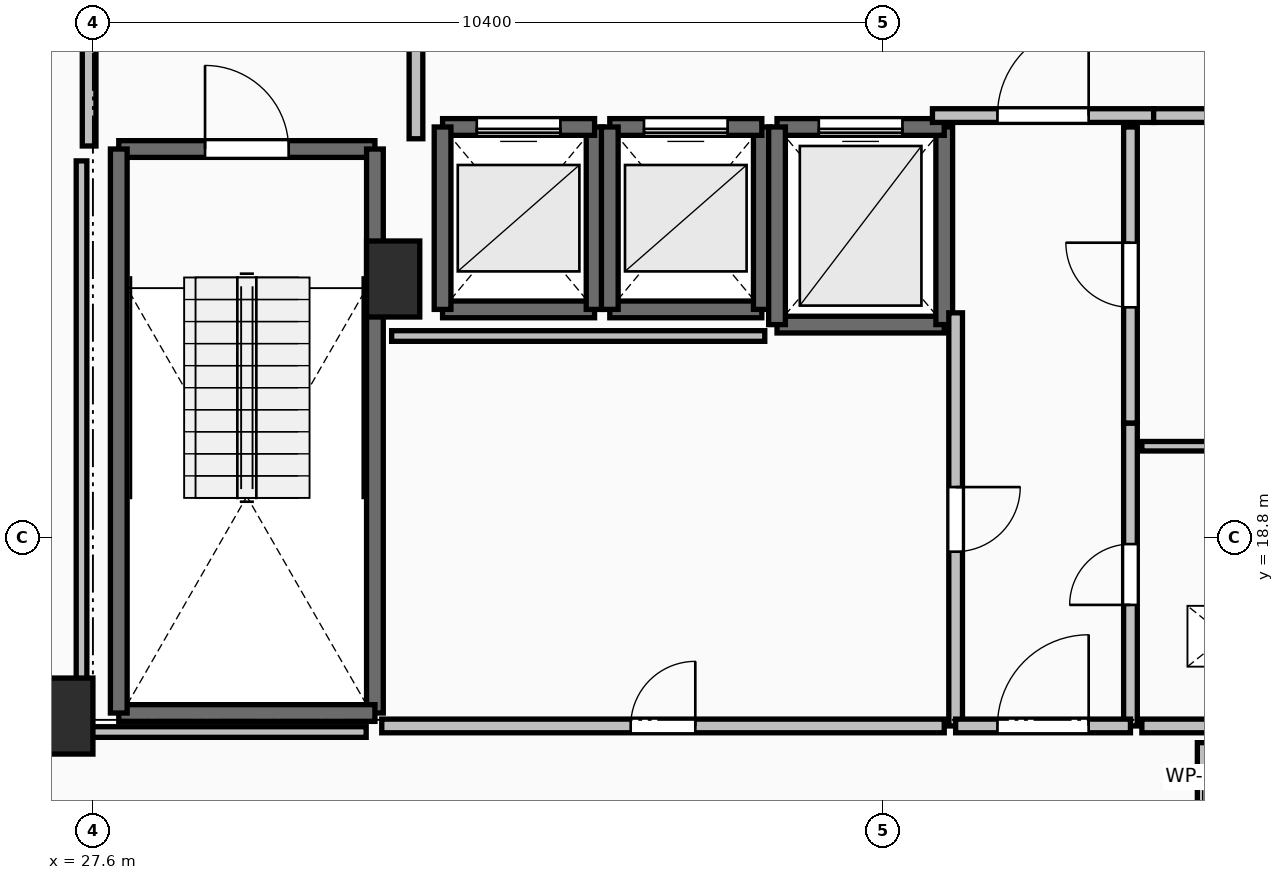
"""IFC4 building model, lengths in metres.
Left out: names, types, materials, properties, quantities, classifications, styles, units other than length and angle.
Written with IfcOpenShell. Run it as: python <this file> out.ifc"""

import sys

from ifc_helpers import new_model, si_unit, direction, frame, frame_2d, origin, origin_2d, place, context, subcontext, project, spatial, rectangle, extrude, element, fill, save


model = new_model("IFC4")
c1 = context("Model", 3, precision=1e-05, world=origin(), true_north=direction((0.0, 1.0)))
c2 = subcontext(c1, "Body", "Model", "MODEL_VIEW")
j1 = project(units=[si_unit("LENGTHUNIT", "METRE"), si_unit("PLANEANGLEUNIT", "RADIAN")], contexts=[c1])
p1 = place(None, origin())
s1 = spatial("IfcSite", under=j1, at=p1, CompositionType="ELEMENT")
p2 = place(p1, origin())
s2 = spatial("IfcBuilding", under=s1, at=p2, CompositionType="ELEMENT")
p3 = place(p2, frame((0.0, 0.0, 210.75)))
s3 = spatial("IfcBuildingStorey", under=s2, at=p3, CompositionType="ELEMENT", Elevation=210.75)
for number, where, z_axis, x_axis in (
    (1, (27.25, 16.45, 0.0), (0.0, 0.0, 1.0), (1.0, 0.0, 0.0)),
    (2, (31.55, 22.2, 0.0), (0.0, 0.0, 1.0), (1.0, 0.0, 0.0)),
):
    element("IfcColumn", number, at=place(p3, frame(where, z_axis=z_axis, x_axis=x_axis)), inside=s3, PredefinedType="PILASTER", context=c2, shape_type="SweptSolid", body=[
        extrude(rectangle(XDim=0.7, YDim=1.0, at=origin_2d()), origin(), (0.0, 0.0, 1.0), 3.55),
    ])
p4 = place(p3, frame((27.94, 23.91, 0.0), z_axis=(0.0, 0.0, 1.0), x_axis=(1.0, 0.0, 0.0)))
e3 = element("IfcWall", 3, at=p4, inside=s3, PredefinedType="SOLIDWALL", context=c2, shape_type="SweptSolid", body=[
    extrude(rectangle(XDim=3.37, YDim=0.22, at=frame_2d((1.685, 0.0))), origin(), (0.0, 0.0, 1.0), 3.29),
])
p5 = place(p4, frame((1.135, 0.0, 0.0)))
e4 = element("IfcOpeningElement", 4, at=p5, cuts=e3, PredefinedType="OPENING", context=c2, shape_type="SweptSolid", body=[
    extrude(rectangle(XDim=1.1, YDim=2.15, at=frame_2d((0.55, 1.075))), frame((0.0, 0.125, 0.0), z_axis=(0.0, -1.0, 0.0), x_axis=(1.0, 0.0, 0.0)), (0.0, 0.0, 1.0), 0.25),
])
p6 = place(p3, frame((31.31, 23.91, 0.0), z_axis=(0.0, 0.0, 1.0), x_axis=(0.0, -1.0, 0.0)))
e5 = element("IfcWall", 5, at=p6, inside=s3, PredefinedType="SOLIDWALL", context=c2, shape_type="SweptSolid", body=[
    extrude(rectangle(XDim=7.42, YDim=0.22, at=frame_2d((3.71, 0.0))), origin(), (0.0, 0.0, 1.0), 3.29),
])
p7 = place(p3, frame((31.31, 16.49, 0.0), z_axis=(0.0, 0.0, 1.0), x_axis=(-1.0, 0.0, 0.0)))
e6 = element("IfcWall", 6, at=p7, inside=s3, PredefinedType="SOLIDWALL", context=c2, shape_type="SweptSolid", body=[
    extrude(rectangle(XDim=3.37, YDim=0.22, at=frame_2d((1.685, 0.0))), origin(), (0.0, 0.0, 1.0), 3.29),
])
p8 = place(p3, frame((27.94, 16.49, 0.0), z_axis=(0.0, 0.0, 1.0), x_axis=(0.0, 1.0, 0.0)))
e7 = element("IfcWall", 7, at=p8, inside=s3, PredefinedType="SOLIDWALL", context=c2, shape_type="SweptSolid", body=[
    extrude(rectangle(XDim=7.42, YDim=0.22, at=frame_2d((3.71, 0.0))), origin(), (0.0, 0.0, 1.0), 3.29),
])
p9 = place(p3, frame((32.2, 21.8, 0.0), z_axis=(0.0, 0.0, 1.0), x_axis=(1.0, 0.0, 0.0)))
e8 = element("IfcWall", 8, at=p9, inside=s3, PredefinedType="SOLIDWALL", context=c2, shape_type="SweptSolid", body=[
    extrude(rectangle(XDim=2.0, YDim=0.22, at=frame_2d((1.0, 0.0))), origin(), (0.0, 0.0, 1.0), 3.29),
])
p10 = place(p3, frame((34.2, 21.8, 0.0), z_axis=(0.0, 0.0, 1.0), x_axis=(0.0, 1.0, 0.0)))
e9 = element("IfcWall", 9, at=p10, inside=s3, PredefinedType="SOLIDWALL", context=c2, shape_type="SweptSolid", body=[
    extrude(rectangle(XDim=2.4, YDim=0.22, at=frame_2d((1.2, 0.0))), origin(), (0.0, 0.0, 1.0), 3.29),
])
p11 = place(p3, frame((34.2, 24.2, 0.0), z_axis=(0.0, 0.0, 1.0), x_axis=(-1.0, 0.0, 0.0)))
e10 = element("IfcWall", 10, at=p11, inside=s3, PredefinedType="SOLIDWALL", context=c2, shape_type="SweptSolid", body=[
    extrude(rectangle(XDim=2.0, YDim=0.22, at=frame_2d((1.0, 0.0))), origin(), (0.0, 0.0, 1.0), 3.29),
])
p12 = place(p11, frame((0.45, 0.0, 0.0)))
e11 = element("IfcOpeningElement", 11, at=p12, cuts=e10, PredefinedType="OPENING", context=c2, shape_type="SweptSolid", body=[
    extrude(rectangle(XDim=1.1, YDim=2.2, at=frame_2d((0.55, 1.1))), frame((0.0, 0.125, 0.0), z_axis=(0.0, -1.0, 0.0), x_axis=(1.0, 0.0, 0.0)), (0.0, 0.0, 1.0), 0.25),
])
p13 = place(p3, frame((32.2, 24.2, 0.0), z_axis=(0.0, 0.0, 1.0), x_axis=(0.0, -1.0, 0.0)))
e12 = element("IfcWall", 12, at=p13, inside=s3, PredefinedType="SOLIDWALL", context=c2, shape_type="SweptSolid", body=[
    extrude(rectangle(XDim=2.4, YDim=0.22, at=frame_2d((1.2, 0.0))), origin(), (0.0, 0.0, 1.0), 3.29),
])
p14 = place(p3, frame((34.4, 21.8, 0.0), z_axis=(0.0, 0.0, 1.0), x_axis=(1.0, 0.0, 0.0)))
e13 = element("IfcWall", 13, at=p14, inside=s3, PredefinedType="SOLIDWALL", context=c2, shape_type="SweptSolid", body=[
    extrude(rectangle(XDim=2.0, YDim=0.22, at=frame_2d((1.0, 0.0))), origin(), (0.0, 0.0, 1.0), 3.29),
])
p15 = place(p3, frame((36.4, 21.8, 0.0), z_axis=(0.0, 0.0, 1.0), x_axis=(0.0, 1.0, 0.0)))
e14 = element("IfcWall", 14, at=p15, inside=s3, PredefinedType="SOLIDWALL", context=c2, shape_type="SweptSolid", body=[
    extrude(rectangle(XDim=2.4, YDim=0.22, at=frame_2d((1.2, 0.0))), origin(), (0.0, 0.0, 1.0), 3.29),
])
p16 = place(p3, frame((36.4, 24.2, 0.0), z_axis=(0.0, 0.0, 1.0), x_axis=(-1.0, 0.0, 0.0)))
e15 = element("IfcWall", 15, at=p16, inside=s3, PredefinedType="SOLIDWALL", context=c2, shape_type="SweptSolid", body=[
    extrude(rectangle(XDim=2.0, YDim=0.22, at=frame_2d((1.0, 0.0))), origin(), (0.0, 0.0, 1.0), 3.29),
])
p17 = place(p16, frame((0.45, 0.0, 0.0)))
e16 = element("IfcOpeningElement", 16, at=p17, cuts=e15, PredefinedType="OPENING", context=c2, shape_type="SweptSolid", body=[
    extrude(rectangle(XDim=1.1, YDim=2.2, at=frame_2d((0.55, 1.1))), frame((0.0, 0.125, 0.0), z_axis=(0.0, -1.0, 0.0), x_axis=(1.0, 0.0, 0.0)), (0.0, 0.0, 1.0), 0.25),
])
p18 = place(p3, frame((34.4, 24.2, 0.0), z_axis=(0.0, 0.0, 1.0), x_axis=(0.0, -1.0, 0.0)))
e17 = element("IfcWall", 17, at=p18, inside=s3, PredefinedType="SOLIDWALL", context=c2, shape_type="SweptSolid", body=[
    extrude(rectangle(XDim=2.4, YDim=0.22, at=frame_2d((1.2, 0.0))), origin(), (0.0, 0.0, 1.0), 3.29),
])
p19 = place(p3, frame((36.6, 21.6, 0.0), z_axis=(0.0, 0.0, 1.0), x_axis=(1.0, 0.0, 0.0)))
e18 = element("IfcWall", 18, at=p19, inside=s3, PredefinedType="SOLIDWALL", context=c2, shape_type="SweptSolid", body=[
    extrude(rectangle(XDim=2.2, YDim=0.22, at=frame_2d((1.1, 0.0))), origin(), (0.0, 0.0, 1.0), 3.29),
])
p20 = place(p3, frame((38.8, 21.6, 0.0), z_axis=(0.0, 0.0, 1.0), x_axis=(0.0, 1.0, 0.0)))
e19 = element("IfcWall", 19, at=p20, inside=s3, PredefinedType="SOLIDWALL", context=c2, shape_type="SweptSolid", body=[
    extrude(rectangle(XDim=2.6, YDim=0.22, at=frame_2d((1.3, 0.0))), origin(), (0.0, 0.0, 1.0), 3.29),
])
p21 = place(p3, frame((38.8, 24.2, 0.0), z_axis=(0.0, 0.0, 1.0), x_axis=(-1.0, 0.0, 0.0)))
e20 = element("IfcWall", 20, at=p21, inside=s3, PredefinedType="SOLIDWALL", context=c2, shape_type="SweptSolid", body=[
    extrude(rectangle(XDim=2.2, YDim=0.22, at=frame_2d((1.1, 0.0))), origin(), (0.0, 0.0, 1.0), 3.29),
])
p22 = place(p21, frame((0.55, 0.0, 0.0)))
e21 = element("IfcOpeningElement", 21, at=p22, cuts=e20, PredefinedType="OPENING", context=c2, shape_type="SweptSolid", body=[
    extrude(rectangle(XDim=1.1, YDim=2.2, at=frame_2d((0.55, 1.1))), frame((0.0, 0.125, 0.0), z_axis=(0.0, -1.0, 0.0), x_axis=(1.0, 0.0, 0.0)), (0.0, 0.0, 1.0), 0.25),
])
p23 = place(p3, frame((36.6, 24.2, 0.0), z_axis=(0.0, 0.0, 1.0), x_axis=(0.0, -1.0, 0.0)))
e22 = element("IfcWall", 22, at=p23, inside=s3, PredefinedType="SOLIDWALL", context=c2, shape_type="SweptSolid", body=[
    extrude(rectangle(XDim=2.6, YDim=0.22, at=frame_2d((1.3, 0.0))), origin(), (0.0, 0.0, 1.0), 3.29),
])
p24 = place(p3, frame((31.85, 24.045, 0.0), z_axis=(0.0, 0.0, 1.0), x_axis=(0.0, 1.0, 0.0)))
e23 = element("IfcWall", 23, at=p24, inside=s3, PredefinedType="PARTITIONING", context=c2, shape_type="SweptSolid", body=[
    extrude(rectangle(XDim=3.91, YDim=0.18, at=frame_2d((1.955, 0.0))), origin(), (0.0, 0.0, 1.0), 3.29),
])
p25 = place(p24, frame((1.355, 0.0, 0.0)))
e24 = element("IfcOpeningElement", 24, at=p25, cuts=e23, PredefinedType="OPENING", context=c2, shape_type="SweptSolid", body=[
    extrude(rectangle(XDim=1.2, YDim=2.15, at=frame_2d((0.6, 1.075))), frame((0.0, 0.105, 0.0), z_axis=(0.0, -1.0, 0.0), x_axis=(1.0, 0.0, 0.0)), (0.0, 0.0, 1.0), 0.21),
])
p26 = place(p3, frame((27.55, 28.0, 0.0), z_axis=(0.0, 0.0, 1.0), x_axis=(0.0, -1.0, 0.0)))
e25 = element("IfcWall", 25, at=p26, inside=s3, PredefinedType="PARTITIONING", context=c2, shape_type="SweptSolid", body=[
    extrude(rectangle(XDim=4.05, YDim=0.18, at=frame_2d((2.025, 0.0))), origin(), (0.0, 0.0, 1.0), 3.29),
])
p27 = place(p26, frame((1.425, 0.0, 0.0)))
e26 = element("IfcOpeningElement", 26, at=p27, cuts=e25, PredefinedType="OPENING", context=c2, shape_type="SweptSolid", body=[
    extrude(rectangle(XDim=1.2, YDim=2.15, at=frame_2d((0.6, 1.075))), frame((0.0, 0.105, 0.0), z_axis=(0.0, -1.0, 0.0), x_axis=(1.0, 0.0, 0.0)), (0.0, 0.0, 1.0), 0.21),
])
p28 = place(p3, frame((38.645, 24.35, 0.0), z_axis=(0.0, 0.0, 1.0), x_axis=(1.0, 0.0, 0.0)))
e27 = element("IfcWall", 27, at=p28, inside=s3, PredefinedType="PARTITIONING", context=c2, shape_type="SweptSolid", body=[
    extrude(rectangle(XDim=2.91, YDim=0.18, at=frame_2d((1.455, 0.0))), origin(), (0.0, 0.0, 1.0), 3.29),
])
p29 = place(p28, frame((0.855, 0.0, 0.0)))
e28 = element("IfcOpeningElement", 28, at=p29, cuts=e27, PredefinedType="OPENING", context=c2, shape_type="SweptSolid", body=[
    extrude(rectangle(XDim=1.2, YDim=2.15, at=frame_2d((0.6, 1.075))), frame((0.0, 0.105, 0.0), z_axis=(0.0, -1.0, 0.0), x_axis=(1.0, 0.0, 0.0)), (0.0, 0.0, 1.0), 0.21),
])
p30 = place(p3, frame((41.555, 24.35, 0.0), z_axis=(0.0, 0.0, 1.0), x_axis=(1.0, 0.0, 0.0)))
e29 = element("IfcWall", 29, at=p30, inside=s3, PredefinedType="PARTITIONING", context=c2, shape_type="SweptSolid", body=[
    extrude(rectangle(XDim=2.445, YDim=0.18, at=frame_2d((1.223, 0.0))), origin(), (0.0, 0.0, 1.0), 3.29),
])
p31 = place(p30, frame((0.798, 0.0, 0.0)))
e30 = element("IfcOpeningElement", 30, at=p31, cuts=e29, PredefinedType="OPENING", context=c2, shape_type="SweptSolid", body=[
    extrude(rectangle(XDim=0.85, YDim=2.1, at=frame_2d((0.425, 1.05))), frame((0.0, 0.105, 0.0), z_axis=(0.0, -1.0, 0.0), x_axis=(1.0, 0.0, 0.0)), (0.0, 0.0, 1.0), 0.21),
])
p32 = place(p3, frame((41.25, 16.32, 0.0), z_axis=(0.0, 0.0, 1.0), x_axis=(0.0, 1.0, 0.0)))
e31 = element("IfcWall", 31, at=p32, inside=s3, PredefinedType="PARTITIONING", context=c2, shape_type="SweptSolid", body=[
    extrude(rectangle(XDim=3.985, YDim=0.18, at=frame_2d((1.992, 0.0))), origin(), (0.0, 0.0, 1.0), 3.29),
])
p33 = place(p32, frame((1.593, 0.0, 0.0)))
e32 = element("IfcOpeningElement", 32, at=p33, cuts=e31, PredefinedType="OPENING", context=c2, shape_type="SweptSolid", body=[
    extrude(rectangle(XDim=0.8, YDim=2.05, at=frame_2d((0.4, 1.025))), frame((0.0, 0.105, 0.0), z_axis=(0.0, -1.0, 0.0), x_axis=(1.0, 0.0, 0.0)), (0.0, 0.0, 1.0), 0.21),
])
p34 = place(p3, frame((41.25, 20.305, 0.0), z_axis=(0.0, 0.0, 1.0), x_axis=(0.0, 1.0, 0.0)))
e33 = element("IfcWall", 33, at=p34, inside=s3, PredefinedType="PARTITIONING", context=c2, shape_type="SweptSolid", body=[
    extrude(rectangle(XDim=3.895, YDim=0.18, at=frame_2d((1.948, 0.0))), origin(), (0.0, 0.0, 1.0), 3.29),
])
p35 = place(p34, frame((1.522, 0.0, 0.0)))
e34 = element("IfcOpeningElement", 34, at=p35, cuts=e33, PredefinedType="OPENING", context=c2, shape_type="SweptSolid", body=[
    extrude(rectangle(XDim=0.85, YDim=2.1, at=frame_2d((0.425, 1.05))), frame((0.0, 0.105, 0.0), z_axis=(0.0, -1.0, 0.0), x_axis=(1.0, 0.0, 0.0)), (0.0, 0.0, 1.0), 0.21),
])
p36 = place(p3, frame((38.95, 21.755, 0.0), z_axis=(0.0, 0.0, 1.0), x_axis=(0.0, -1.0, 0.0)))
e35 = element("IfcWall", 35, at=p36, inside=s3, PredefinedType="PARTITIONING", context=c2, shape_type="SweptSolid", body=[
    extrude(rectangle(XDim=5.435, YDim=0.18, at=frame_2d((2.717, 0.0))), origin(), (0.0, 0.0, 1.0), 3.29),
])
p37 = place(p36, frame((2.292, 0.0, 0.0)))
e36 = element("IfcOpeningElement", 36, at=p37, cuts=e35, PredefinedType="OPENING", context=c2, shape_type="SweptSolid", body=[
    extrude(rectangle(XDim=0.85, YDim=2.1, at=frame_2d((0.425, 1.05))), frame((0.0, 0.105, 0.0), z_axis=(0.0, -1.0, 0.0), x_axis=(1.0, 0.0, 0.0)), (0.0, 0.0, 1.0), 0.21),
])
p38 = place(p3, frame((38.95, 16.32, 0.0), z_axis=(0.0, 0.0, 1.0), x_axis=(1.0, 0.0, 0.0)))
e37 = element("IfcWall", 37, at=p38, inside=s3, PredefinedType="PARTITIONING", context=c2, shape_type="SweptSolid", body=[
    extrude(rectangle(XDim=2.3, YDim=0.18, at=frame_2d((1.15, 0.0))), origin(), (0.0, 0.0, 1.0), 3.29),
])
p39 = place(p38, frame((0.55, 0.0, 0.0)))
e38 = element("IfcOpeningElement", 38, at=p39, cuts=e37, PredefinedType="OPENING", context=c2, shape_type="SweptSolid", body=[
    extrude(rectangle(XDim=1.2, YDim=2.15, at=frame_2d((0.6, 1.075))), frame((0.0, 0.105, 0.0), z_axis=(0.0, -1.0, 0.0), x_axis=(1.0, 0.0, 0.0)), (0.0, 0.0, 1.0), 0.21),
])
p40 = place(p3, frame((44.6, 20.0, 0.0), z_axis=(0.0, 0.0, 1.0), x_axis=(-1.0, 0.0, 0.0)))
e39 = element("IfcWall", 39, at=p40, inside=s3, PredefinedType="PARTITIONING", context=c2, shape_type="SweptSolid", body=[
    extrude(rectangle(XDim=3.2, YDim=0.125, at=frame_2d((1.6, 0.0))), origin(), (0.0, 0.0, 1.0), 3.29),
])
p41 = place(p3, frame((41.4, 16.32, 0.0), z_axis=(0.0, 0.0, 1.0), x_axis=(1.0, 0.0, 0.0)))
e40 = element("IfcWall", 40, at=p41, inside=s3, PredefinedType="PARTITIONING", context=c2, shape_type="SweptSolid", body=[
    extrude(rectangle(XDim=3.2, YDim=0.18, at=frame_2d((1.6, 0.0))), origin(), (0.0, 0.0, 1.0), 3.29),
])
p42 = place(p41, frame((1.2, 0.0, 0.0)))
e41 = element("IfcOpeningElement", 41, at=p42, cuts=e40, PredefinedType="OPENING", context=c2, shape_type="SweptSolid", body=[
    extrude(rectangle(XDim=0.8, YDim=2.05, at=frame_2d((0.4, 1.025))), frame((0.0, 0.105, 0.0), z_axis=(0.0, -1.0, 0.0), x_axis=(1.0, 0.0, 0.0)), (0.0, 0.0, 1.0), 0.21),
])
p43 = place(p3, frame((31.4, 16.32, 0.0), z_axis=(0.0, 0.0, 1.0), x_axis=(1.0, 0.0, 0.0)))
e42 = element("IfcWall", 42, at=p43, inside=s3, PredefinedType="PARTITIONING", context=c2, shape_type="SweptSolid", body=[
    extrude(rectangle(XDim=7.4, YDim=0.18, at=frame_2d((3.7, 0.0))), origin(), (0.0, 0.0, 1.0), 3.29),
])
p44 = place(p43, frame((3.275, 0.0, 0.0)))
e43 = element("IfcOpeningElement", 43, at=p44, cuts=e42, PredefinedType="OPENING", context=c2, shape_type="SweptSolid", body=[
    extrude(rectangle(XDim=0.85, YDim=2.1, at=frame_2d((0.425, 1.05))), frame((0.0, 0.105, 0.0), z_axis=(0.0, -1.0, 0.0), x_axis=(1.0, 0.0, 0.0)), (0.0, 0.0, 1.0), 0.21),
])
p45 = place(p3, frame((36.439, 21.45, 0.0), z_axis=(0.0, 0.0, 1.0), x_axis=(-1.0, 0.0, 0.0)))
e44 = element("IfcWall", 44, at=p45, inside=s3, PredefinedType="PARTITIONING", context=c2, shape_type="SweptSolid", body=[
    extrude(rectangle(XDim=4.909, YDim=0.14, at=frame_2d((2.455, 0.0))), origin(), (0.0, 0.0, 1.0), 3.29),
])
p46 = place(p3, frame((27.45, 23.754, 0.0), z_axis=(0.0, 0.0, 1.0), x_axis=(0.0, -1.0, 0.0)))
e45 = element("IfcWall", 45, at=p46, inside=s3, PredefinedType="PARTITIONING", context=c2, shape_type="SweptSolid", body=[
    extrude(rectangle(XDim=7.514, YDim=0.14, at=frame_2d((3.757, 0.0))), origin(), (0.0, 0.0, 1.0), 2.482),
])
p47 = place(p3, frame((27.45, 16.24, 0.0), z_axis=(0.0, 0.0, 1.0), x_axis=(1.0, 0.0, 0.0)))
e46 = element("IfcWall", 46, at=p47, inside=s3, PredefinedType="PARTITIONING", context=c2, shape_type="SweptSolid", body=[
    extrude(rectangle(XDim=3.745, YDim=0.14, at=frame_2d((1.873, 0.0))), origin(), (0.0, 0.0, 1.0), 2.482),
])
p48 = place(p3, frame((42.2, 16.1, 0.0), z_axis=(0.0, 0.0, 1.0), x_axis=(0.0, -1.0, 0.0)))
e47 = element("IfcWall", 47, at=p48, inside=s3, PredefinedType="PARTITIONING", context=c2, shape_type="SweptSolid", body=[
    extrude(rectangle(XDim=1.83, YDim=0.14, at=frame_2d((0.915, 0.0))), origin(), (0.0, 0.0, 1.0), 2.979),
])
p49 = place(p5, origin())
e48 = element("IfcDoor", 48, at=p49, inside=s3, OperationType="SINGLE_SWING_LEFT", PredefinedType="DOOR", context=c2, shape_type="SweptSolid", body=[
    extrude(rectangle(XDim=1.1, YDim=2.15, at=frame_2d((0.55, 1.075))), frame((0.0, 0.025, 0.0), z_axis=(0.0, -1.0, 0.0), x_axis=(1.0, 0.0, 0.0)), (0.0, 0.0, 1.0), 0.05),
])
fill(e4, e48)
p50 = place(p12, origin())
e49 = element("IfcDoor", 49, at=p50, inside=s3, OperationType="SLIDING_TO_LEFT", PredefinedType="DOOR", context=c2, shape_type="SweptSolid", body=[
    extrude(rectangle(XDim=1.1, YDim=2.2, at=frame_2d((0.55, 1.1))), frame((0.0, 0.025, 0.0), z_axis=(0.0, -1.0, 0.0), x_axis=(1.0, 0.0, 0.0)), (0.0, 0.0, 1.0), 0.05),
])
fill(e11, e49)
p51 = place(p17, origin())
e50 = element("IfcDoor", 50, at=p51, inside=s3, OperationType="SLIDING_TO_LEFT", PredefinedType="DOOR", context=c2, shape_type="SweptSolid", body=[
    extrude(rectangle(XDim=1.1, YDim=2.2, at=frame_2d((0.55, 1.1))), frame((0.0, 0.025, 0.0), z_axis=(0.0, -1.0, 0.0), x_axis=(1.0, 0.0, 0.0)), (0.0, 0.0, 1.0), 0.05),
])
fill(e16, e50)
p52 = place(p22, origin())
e51 = element("IfcDoor", 51, at=p52, inside=s3, OperationType="SLIDING_TO_LEFT", PredefinedType="DOOR", context=c2, shape_type="SweptSolid", body=[
    extrude(rectangle(XDim=1.1, YDim=2.2, at=frame_2d((0.55, 1.1))), frame((0.0, 0.025, 0.0), z_axis=(0.0, -1.0, 0.0), x_axis=(1.0, 0.0, 0.0)), (0.0, 0.0, 1.0), 0.05),
])
fill(e21, e51)
p53 = place(p29, origin())
e52 = element("IfcDoor", 52, at=p53, inside=s3, OperationType="SINGLE_SWING_RIGHT", PredefinedType="DOOR", context=c2, shape_type="SweptSolid", body=[
    extrude(rectangle(XDim=1.2, YDim=2.15, at=frame_2d((0.6, 1.075))), frame((0.0, 0.025, 0.0), z_axis=(0.0, -1.0, 0.0), x_axis=(1.0, 0.0, 0.0)), (0.0, 0.0, 1.0), 0.05),
])
fill(e28, e52)
p54 = place(p33, origin())
e53 = element("IfcDoor", 53, at=p54, inside=s3, OperationType="SINGLE_SWING_LEFT", PredefinedType="DOOR", context=c2, shape_type="SweptSolid", body=[
    extrude(rectangle(XDim=0.8, YDim=2.05, at=frame_2d((0.4, 1.025))), frame((0.0, 0.025, 0.0), z_axis=(0.0, -1.0, 0.0), x_axis=(1.0, 0.0, 0.0)), (0.0, 0.0, 1.0), 0.05),
])
fill(e32, e53)
p55 = place(p35, origin())
e54 = element("IfcDoor", 54, at=p55, inside=s3, OperationType="SINGLE_SWING_RIGHT", PredefinedType="DOOR", context=c2, shape_type="SweptSolid", body=[
    extrude(rectangle(XDim=0.85, YDim=2.1, at=frame_2d((0.425, 1.05))), frame((0.0, 0.025, 0.0), z_axis=(0.0, -1.0, 0.0), x_axis=(1.0, 0.0, 0.0)), (0.0, 0.0, 1.0), 0.05),
])
fill(e34, e54)
p56 = place(p37, origin())
e55 = element("IfcDoor", 55, at=p56, inside=s3, OperationType="SINGLE_SWING_LEFT", PredefinedType="DOOR", context=c2, shape_type="SweptSolid", body=[
    extrude(rectangle(XDim=0.85, YDim=2.1, at=frame_2d((0.425, 1.05))), frame((0.0, 0.025, 0.0), z_axis=(0.0, -1.0, 0.0), x_axis=(1.0, 0.0, 0.0)), (0.0, 0.0, 1.0), 0.05),
])
fill(e36, e55)
p57 = place(p39, origin())
e56 = element("IfcDoor", 56, at=p57, inside=s3, OperationType="SINGLE_SWING_RIGHT", PredefinedType="DOOR", context=c2, shape_type="SweptSolid", body=[
    extrude(rectangle(XDim=1.2, YDim=2.15, at=frame_2d((0.6, 1.075))), frame((0.0, 0.025, 0.0), z_axis=(0.0, -1.0, 0.0), x_axis=(1.0, 0.0, 0.0)), (0.0, 0.0, 1.0), 0.05),
])
fill(e38, e56)
p58 = place(p44, origin())
e57 = element("IfcDoor", 57, at=p58, inside=s3, OperationType="SINGLE_SWING_RIGHT", PredefinedType="DOOR", context=c2, shape_type="SweptSolid", body=[
    extrude(rectangle(XDim=0.85, YDim=2.1, at=frame_2d((0.425, 1.05))), frame((0.0, 0.025, 0.0), z_axis=(0.0, -1.0, 0.0), x_axis=(1.0, 0.0, 0.0)), (0.0, 0.0, 1.0), 0.05),
])
fill(e43, e57)
save(model, sys.argv[1])
